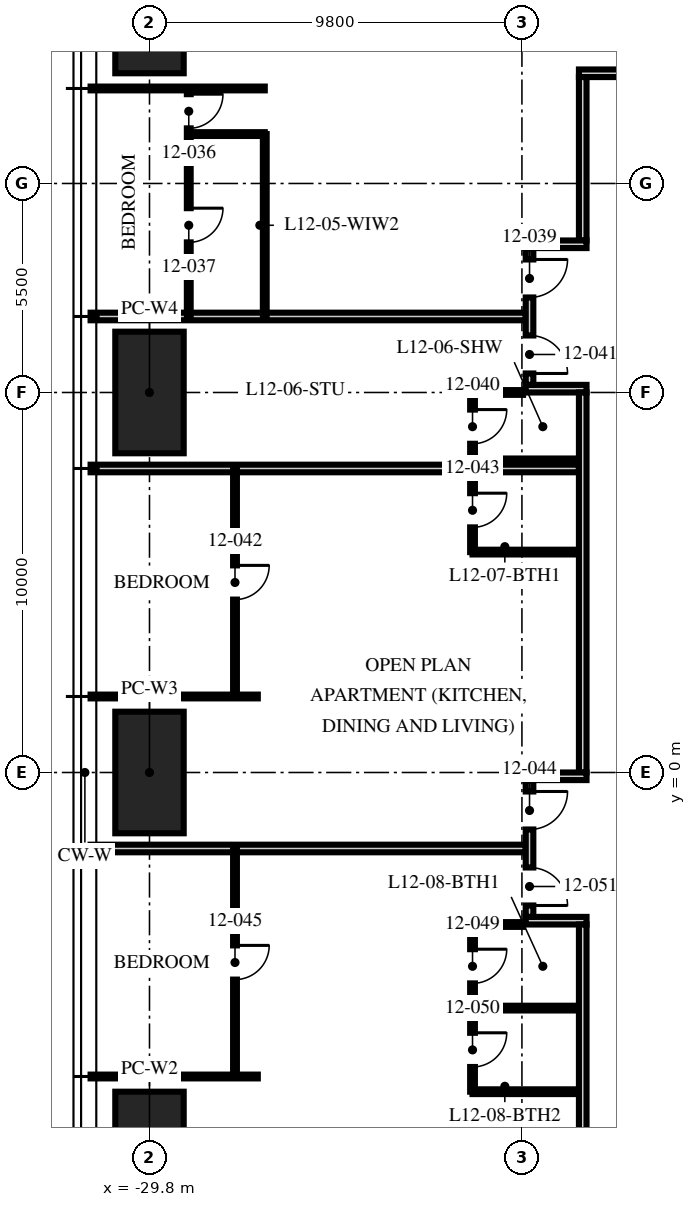
"""IFC4 building model, lengths in metres.
Left out: names, types, materials, properties, quantities, classifications, styles, units other than length and angle.
Written with IfcOpenShell. Run it as: python <this file> out.ifc"""

import sys

from ifc_helpers import new_model, si_unit, direction, frame, frame_2d, origin, origin_2d, place, context, subcontext, project, spatial, rectangle, hollow_rectangle, extrude, element, fill, save


model = new_model("IFC4")
c1 = context("Model", 3, precision=1e-05, world=origin(), true_north=direction((0.0, 1.0)))
c2 = subcontext(c1, "Body", "Model", "MODEL_VIEW")
j1 = project(units=[si_unit("LENGTHUNIT", "METRE"), si_unit("PLANEANGLEUNIT", "RADIAN")], contexts=[c1])
p1 = place(None, origin())
s1 = spatial("IfcSite", under=j1, at=p1, CompositionType="ELEMENT")
p2 = place(p1, origin())
s2 = spatial("IfcBuilding", under=s1, at=p2, CompositionType="ELEMENT")
p3 = place(p2, frame((0.0, 0.0, 51.0)))
s3 = spatial("IfcBuildingStorey", under=s2, at=p3, CompositionType="ELEMENT", Elevation=51.0)
for number, where, z_axis, x_axis in (
    (1, (-29.8, -10.0, 0.0), (0.0, 0.0, 1.0), (0.0, 1.0, 0.0)),
    (2, (-29.8, 0.0, 0.0), (0.0, 0.0, 1.0), (0.0, 1.0, 0.0)),
    (3, (-29.8, 10.0, 0.0), (0.0, 0.0, 1.0), (0.0, 1.0, 0.0)),
    (4, (-29.8, 20.0, 0.0), (0.0, 0.0, 1.0), (0.0, 1.0, 0.0)),
):
    element("IfcColumn", number, at=place(p3, frame(where, z_axis=z_axis, x_axis=x_axis)), inside=s3, PredefinedType="COLUMN", context=c2, shape_type="SweptSolid", body=[
        extrude(hollow_rectangle(XDim=3.2, YDim=1.8, WallThickness=0.2, at=origin_2d()), origin(), (0.0, 0.0, 1.0), 3.75),
    ])
p4 = place(p3, frame((-26.767, 18.0, 0.0), z_axis=(0.0, 0.0, 1.0), x_axis=(-1.0, 0.0, 0.0)))
e5 = element("IfcWall", 5, at=p4, inside=s3, PredefinedType="PARTITIONING", context=c2, shape_type="SweptSolid", body=[
    extrude(rectangle(XDim=4.583, YDim=0.1, at=frame_2d((2.292, 0.0))), origin(), (0.0, 0.0, 1.0), 2.71),
])
p5 = place(p3, frame((-19.9, 12.0, 0.0), z_axis=(0.0, 0.0, 1.0), x_axis=(-1.0, 0.0, 0.0)))
e6 = element("IfcWall", 6, at=p5, inside=s3, PredefinedType="PARTITIONING", context=c2, shape_type="SweptSolid", body=[
    extrude(rectangle(XDim=11.45, YDim=0.2, at=frame_2d((5.725, 0.0))), origin(), (0.0, 0.0, 1.0), 2.71),
])
p6 = place(p3, frame((-18.5, 8.0, 0.0), z_axis=(0.0, 0.0, 1.0), x_axis=(-1.0, 0.0, 0.0)))
e7 = element("IfcWall", 7, at=p6, inside=s3, PredefinedType="PARTITIONING", context=c2, shape_type="SweptSolid", body=[
    extrude(rectangle(XDim=12.85, YDim=0.2, at=frame_2d((6.425, 0.0))), origin(), (0.0, 0.0, 1.0), 2.71),
])
p7 = place(p3, frame((-26.95, 2.0, 0.0), z_axis=(0.0, 0.0, 1.0), x_axis=(-1.0, 0.0, 0.0)))
e8 = element("IfcWall", 8, at=p7, inside=s3, PredefinedType="PARTITIONING", context=c2, shape_type="SweptSolid", body=[
    extrude(rectangle(XDim=4.4, YDim=0.1, at=frame_2d((2.2, 0.0))), origin(), (0.0, 0.0, 1.0), 2.71),
])
p8 = place(p3, frame((-19.9, -2.0, 0.0), z_axis=(0.0, 0.0, 1.0), x_axis=(-1.0, 0.0, 0.0)))
e9 = element("IfcWall", 9, at=p8, inside=s3, PredefinedType="PARTITIONING", context=c2, shape_type="SweptSolid", body=[
    extrude(rectangle(XDim=11.45, YDim=0.2, at=frame_2d((5.725, 0.0))), origin(), (0.0, 0.0, 1.0), 2.71),
])
p9 = place(p3, frame((-26.95, -8.0, 0.0), z_axis=(0.0, 0.0, 1.0), x_axis=(-1.0, 0.0, 0.0)))
e10 = element("IfcWall", 10, at=p9, inside=s3, PredefinedType="PARTITIONING", context=c2, shape_type="SweptSolid", body=[
    extrude(rectangle(XDim=4.4, YDim=0.1, at=frame_2d((2.2, 0.0))), origin(), (0.0, 0.0, 1.0), 2.71),
])
p10 = place(p3, frame((-28.767, 18.0, 0.0), z_axis=(0.0, 0.0, 1.0), x_axis=(0.0, -1.0, 0.0)))
e11 = element("IfcWall", 11, at=p10, inside=s3, PredefinedType="PARTITIONING", context=c2, shape_type="SweptSolid", body=[
    extrude(rectangle(XDim=6.0, YDim=0.1, at=frame_2d((3.0, 0.0))), origin(), (0.0, 0.0, 1.0), 2.61),
])
p11 = place(p10, frame((0.15, 0.0, 0.0)))
e12 = element("IfcOpeningElement", 12, at=p11, cuts=e11, PredefinedType="OPENING", context=c2, shape_type="SweptSolid", body=[
    extrude(rectangle(XDim=0.9, YDim=2.1, at=frame_2d((0.45, 1.05))), frame((0.0, 0.06, 0.0), z_axis=(0.0, -1.0, 0.0), x_axis=(1.0, 0.0, 0.0)), (0.0, 0.0, 1.0), 0.12),
])
p12 = place(p10, frame((3.15, 0.0, 0.0)))
e13 = element("IfcOpeningElement", 13, at=p12, cuts=e11, PredefinedType="OPENING", context=c2, shape_type="SweptSolid", body=[
    extrude(rectangle(XDim=0.9, YDim=2.1, at=frame_2d((0.45, 1.05))), frame((0.0, 0.06, 0.0), z_axis=(0.0, -1.0, 0.0), x_axis=(1.0, 0.0, 0.0)), (0.0, 0.0, 1.0), 0.12),
])
p13 = place(p3, frame((-26.767, 16.8, 0.0), z_axis=(0.0, 0.0, 1.0), x_axis=(-1.0, 0.0, 0.0)))
e14 = element("IfcWall", 14, at=p13, inside=s3, PredefinedType="PARTITIONING", context=c2, shape_type="SweptSolid", body=[
    extrude(rectangle(XDim=2.0, YDim=0.1, at=frame_2d((1.0, 0.0))), origin(), (0.0, 0.0, 1.0), 3.5),
])
p14 = place(p3, frame((-26.767, 16.8, 0.0), z_axis=(0.0, 0.0, 1.0), x_axis=(0.0, -1.0, 0.0)))
e15 = element("IfcWall", 15, at=p14, inside=s3, PredefinedType="PARTITIONING", context=c2, shape_type="SweptSolid", body=[
    extrude(rectangle(XDim=4.8, YDim=0.1, at=frame_2d((2.4, 0.0))), origin(), (0.0, 0.0, 1.0), 2.61),
])
p15 = place(p3, frame((-21.3, 10.0, 0.0), z_axis=(0.0, 0.0, 1.0), x_axis=(0.0, -1.0, 0.0)))
e16 = element("IfcWall", 16, at=p15, inside=s3, PredefinedType="PARTITIONING", context=c2, shape_type="SweptSolid", body=[
    extrude(rectangle(XDim=1.8, YDim=0.125, at=frame_2d((0.9, 0.0))), origin(), (0.0, 0.0, 1.0), 2.492),
])
p16 = place(p15, frame((0.45, 0.0, 0.0)))
e17 = element("IfcOpeningElement", 17, at=p16, cuts=e16, PredefinedType="OPENING", context=c2, shape_type="SweptSolid", body=[
    extrude(rectangle(XDim=0.9, YDim=2.1, at=frame_2d((0.45, 1.05))), frame((0.0, 0.073, 0.0), z_axis=(0.0, -1.0, 0.0), x_axis=(1.0, 0.0, 0.0)), (0.0, 0.0, 1.0), 0.145),
])
p17 = place(p3, frame((-19.97, 10.0, 0.0), z_axis=(0.0, 0.0, 1.0), x_axis=(-1.0, 0.0, 0.0)))
e18 = element("IfcWall", 18, at=p17, inside=s3, PredefinedType="PARTITIONING", context=c2, shape_type="SweptSolid", body=[
    extrude(rectangle(XDim=1.33, YDim=0.125, at=frame_2d((0.665, 0.0))), origin(), (0.0, 0.0, 1.0), 2.492),
])
p18 = place(p3, frame((-18.5, 8.2, 0.0), z_axis=(0.0, 0.0, 1.0), x_axis=(-1.0, 0.0, 0.0)))
e19 = element("IfcWall", 19, at=p18, inside=s3, PredefinedType="PARTITIONING", context=c2, shape_type="SweptSolid", body=[
    extrude(rectangle(XDim=2.8, YDim=0.125, at=frame_2d((1.4, 0.0))), origin(), (0.0, 0.0, 1.0), 3.5),
])
p19 = place(p3, frame((-27.55, 8.0, 0.0), z_axis=(0.0, 0.0, 1.0), x_axis=(0.0, -1.0, 0.0)))
e20 = element("IfcWall", 20, at=p19, inside=s3, PredefinedType="PARTITIONING", context=c2, shape_type="SweptSolid", body=[
    extrude(rectangle(XDim=6.0, YDim=0.1, at=frame_2d((3.0, 0.0))), origin(), (0.0, 0.0, 1.0), 2.61),
])
p20 = place(p19, frame((2.55, 0.0, 0.0)))
e21 = element("IfcOpeningElement", 21, at=p20, cuts=e20, PredefinedType="OPENING", context=c2, shape_type="SweptSolid", body=[
    extrude(rectangle(XDim=0.9, YDim=2.1, at=frame_2d((0.45, 1.05))), frame((0.0, 0.06, 0.0), z_axis=(0.0, -1.0, 0.0), x_axis=(1.0, 0.0, 0.0)), (0.0, 0.0, 1.0), 0.12),
])
p21 = place(p3, frame((-21.3, 8.0, 0.0), z_axis=(0.0, 0.0, 1.0), x_axis=(0.0, -1.0, 0.0)))
e22 = element("IfcWall", 22, at=p21, inside=s3, PredefinedType="PARTITIONING", context=c2, shape_type="SweptSolid", body=[
    extrude(rectangle(XDim=2.2, YDim=0.125, at=frame_2d((1.1, 0.0))), origin(), (0.0, 0.0, 1.0), 3.5),
])
p22 = place(p21, frame((0.65, 0.0, 0.0)))
e23 = element("IfcOpeningElement", 23, at=p22, cuts=e22, PredefinedType="OPENING", context=c2, shape_type="SweptSolid", body=[
    extrude(rectangle(XDim=0.9, YDim=2.1, at=frame_2d((0.45, 1.05))), frame((0.0, 0.073, 0.0), z_axis=(0.0, -1.0, 0.0), x_axis=(1.0, 0.0, 0.0)), (0.0, 0.0, 1.0), 0.145),
])
p23 = place(p3, frame((-18.5, 5.8, 0.0), z_axis=(0.0, 0.0, 1.0), x_axis=(-1.0, 0.0, 0.0)))
e24 = element("IfcWall", 24, at=p23, inside=s3, PredefinedType="PARTITIONING", context=c2, shape_type="SweptSolid", body=[
    extrude(rectangle(XDim=2.8, YDim=0.125, at=frame_2d((1.4, 0.0))), origin(), (0.0, 0.0, 1.0), 3.5),
])
p24 = place(p3, frame((-27.55, -2.0, 0.0), z_axis=(0.0, 0.0, 1.0), x_axis=(0.0, -1.0, 0.0)))
e25 = element("IfcWall", 25, at=p24, inside=s3, PredefinedType="PARTITIONING", context=c2, shape_type="SweptSolid", body=[
    extrude(rectangle(XDim=6.0, YDim=0.1, at=frame_2d((3.0, 0.0))), origin(), (0.0, 0.0, 1.0), 2.61),
])
p25 = place(p24, frame((2.55, 0.0, 0.0)))
e26 = element("IfcOpeningElement", 26, at=p25, cuts=e25, PredefinedType="OPENING", context=c2, shape_type="SweptSolid", body=[
    extrude(rectangle(XDim=0.9, YDim=2.1, at=frame_2d((0.45, 1.05))), frame((0.0, 0.06, 0.0), z_axis=(0.0, -1.0, 0.0), x_axis=(1.0, 0.0, 0.0)), (0.0, 0.0, 1.0), 0.12),
])
p26 = place(p3, frame((-21.3, -4.0, 0.0), z_axis=(0.0, 0.0, 1.0), x_axis=(0.0, -1.0, 0.0)))
e27 = element("IfcWall", 27, at=p26, inside=s3, PredefinedType="PARTITIONING", context=c2, shape_type="SweptSolid", body=[
    extrude(rectangle(XDim=4.4, YDim=0.125, at=frame_2d((2.2, 0.0))), origin(), (0.0, 0.0, 1.0), 2.61),
])
p27 = place(p26, frame((0.65, 0.0, 0.0)))
e28 = element("IfcOpeningElement", 28, at=p27, cuts=e27, PredefinedType="OPENING", context=c2, shape_type="SweptSolid", body=[
    extrude(rectangle(XDim=0.9, YDim=2.1, at=frame_2d((0.45, 1.05))), frame((0.0, 0.073, 0.0), z_axis=(0.0, -1.0, 0.0), x_axis=(1.0, 0.0, 0.0)), (0.0, 0.0, 1.0), 0.145),
])
p28 = place(p26, frame((2.85, 0.0, 0.0)))
e29 = element("IfcOpeningElement", 29, at=p28, cuts=e27, PredefinedType="OPENING", context=c2, shape_type="SweptSolid", body=[
    extrude(rectangle(XDim=0.9, YDim=2.1, at=frame_2d((0.45, 1.05))), frame((0.0, 0.073, 0.0), z_axis=(0.0, -1.0, 0.0), x_axis=(1.0, 0.0, 0.0)), (0.0, 0.0, 1.0), 0.145),
])
p29 = place(p3, frame((-19.97, -4.0, 0.0), z_axis=(0.0, 0.0, 1.0), x_axis=(-1.0, 0.0, 0.0)))
e30 = element("IfcWall", 30, at=p29, inside=s3, PredefinedType="PARTITIONING", context=c2, shape_type="SweptSolid", body=[
    extrude(rectangle(XDim=1.33, YDim=0.125, at=frame_2d((0.665, 0.0))), origin(), (0.0, 0.0, 1.0), 3.5),
])
for number, where, z_axis, x_axis in (
    (31, (-18.5, -6.2, 0.0), (0.0, 0.0, 1.0), (-1.0, 0.0, 0.0)),
    (32, (-18.5, -8.4, 0.0), (0.0, 0.0, 1.0), (-1.0, 0.0, 0.0)),
):
    element("IfcWall", number, at=place(p3, frame(where, z_axis=z_axis, x_axis=x_axis)), inside=s3, PredefinedType="PARTITIONING", context=c2, shape_type="SweptSolid", body=[
        extrude(rectangle(XDim=2.8, YDim=0.125, at=frame_2d((1.4, 0.0))), origin(), (0.0, 0.0, 1.0), 3.5),
    ])
p30 = place(p3, frame((-18.5, 18.4, 0.0), z_axis=(0.0, 0.0, 1.0), x_axis=(1.0, 0.0, 0.0)))
e33 = element("IfcWall", 33, at=p30, inside=s3, PredefinedType="PARTITIONING", context=c2, shape_type="SweptSolid", body=[
    extrude(rectangle(XDim=18.5, YDim=0.2, at=frame_2d((9.25, 0.0))), origin(), (0.0, 0.0, 1.0), 2.3),
])
p31 = place(p3, frame((-18.4, 18.3, 0.0), z_axis=(0.0, 0.0, 1.0), x_axis=(0.0, -1.0, 0.0)))
e34 = element("IfcWall", 34, at=p31, inside=s3, PredefinedType="PARTITIONING", context=c2, shape_type="SweptSolid", body=[
    extrude(rectangle(XDim=4.3, YDim=0.2, at=frame_2d((2.15, 0.0))), origin(), (0.0, 0.0, 1.0), 2.3),
])
p32 = place(p3, frame((-18.3, 13.9, 0.0), z_axis=(0.0, 0.0, 1.0), x_axis=(-1.0, 0.0, 0.0)))
e35 = element("IfcWall", 35, at=p32, inside=s3, PredefinedType="PARTITIONING", context=c2, shape_type="SweptSolid", body=[
    extrude(rectangle(XDim=1.6, YDim=0.2, at=frame_2d((0.8, 0.0))), origin(), (0.0, 0.0, 1.0), 3.5),
])
p33 = place(p3, frame((-18.3, 10.1, 0.0), z_axis=(0.0, 0.0, 1.0), x_axis=(-1.0, 0.0, 0.0)))
e36 = element("IfcWall", 36, at=p33, inside=s3, PredefinedType="PARTITIONING", context=c2, shape_type="SweptSolid", body=[
    extrude(rectangle(XDim=1.6, YDim=0.2, at=frame_2d((0.8, 0.0))), origin(), (0.0, 0.0, 1.0), 2.492),
])
p34 = place(p3, frame((-19.8, 13.8, 0.0), z_axis=(0.0, 0.0, 1.0), x_axis=(0.0, -1.0, 0.0)))
e37 = element("IfcWall", 37, at=p34, inside=s3, PredefinedType="PARTITIONING", context=c2, shape_type="SweptSolid", body=[
    extrude(rectangle(XDim=3.6, YDim=0.2, at=frame_2d((1.8, 0.0))), origin(), (0.0, 0.0, 1.0), 3.5),
])
p35 = place(p34, frame((0.3, 0.0, 0.0)))
e38 = element("IfcOpeningElement", 38, at=p35, cuts=e37, PredefinedType="OPENING", context=c2, shape_type="SweptSolid", body=[
    extrude(rectangle(XDim=1.0, YDim=2.2, at=frame_2d((0.5, 1.1))), frame((0.0, 0.11, 0.0), z_axis=(0.0, -1.0, 0.0), x_axis=(1.0, 0.0, 0.0)), (0.0, 0.0, 1.0), 0.22),
])
p36 = place(p34, frame((2.3, 0.0, 0.0)))
e39 = element("IfcOpeningElement", 39, at=p36, cuts=e37, PredefinedType="OPENING", context=c2, shape_type="SweptSolid", body=[
    extrude(rectangle(XDim=1.0, YDim=2.2, at=frame_2d((0.5, 1.1))), frame((0.0, 0.11, 0.0), z_axis=(0.0, -1.0, 0.0), x_axis=(1.0, 0.0, 0.0)), (0.0, 0.0, 1.0), 0.22),
])
p37 = place(p3, frame((-18.4, 10.0, 0.0), z_axis=(0.0, 0.0, 1.0), x_axis=(0.0, -1.0, 0.0)))
e40 = element("IfcWall", 40, at=p37, inside=s3, PredefinedType="PARTITIONING", context=c2, shape_type="SweptSolid", body=[
    extrude(rectangle(XDim=10.0, YDim=0.2, at=frame_2d((5.0, 0.0))), origin(), (0.0, 0.0, 1.0), 2.492),
])
p38 = place(p3, frame((-18.3, -0.1, 0.0), z_axis=(0.0, 0.0, 1.0), x_axis=(-1.0, 0.0, 0.0)))
e41 = element("IfcWall", 41, at=p38, inside=s3, PredefinedType="PARTITIONING", context=c2, shape_type="SweptSolid", body=[
    extrude(rectangle(XDim=1.6, YDim=0.2, at=frame_2d((0.8, 0.0))), origin(), (0.0, 0.0, 1.0), 2.492),
])
p39 = place(p3, frame((-18.3, -3.9, 0.0), z_axis=(0.0, 0.0, 1.0), x_axis=(-1.0, 0.0, 0.0)))
e42 = element("IfcWall", 42, at=p39, inside=s3, PredefinedType="PARTITIONING", context=c2, shape_type="SweptSolid", body=[
    extrude(rectangle(XDim=1.6, YDim=0.2, at=frame_2d((0.8, 0.0))), origin(), (0.0, 0.0, 1.0), 3.5),
])
p40 = place(p3, frame((-19.8, -0.2, 0.0), z_axis=(0.0, 0.0, 1.0), x_axis=(0.0, -1.0, 0.0)))
e43 = element("IfcWall", 43, at=p40, inside=s3, PredefinedType="PARTITIONING", context=c2, shape_type="SweptSolid", body=[
    extrude(rectangle(XDim=3.6, YDim=0.2, at=frame_2d((1.8, 0.0))), origin(), (0.0, 0.0, 1.0), 3.5),
])
p41 = place(p40, frame((0.3, 0.0, 0.0)))
e44 = element("IfcOpeningElement", 44, at=p41, cuts=e43, PredefinedType="OPENING", context=c2, shape_type="SweptSolid", body=[
    extrude(rectangle(XDim=1.0, YDim=2.2, at=frame_2d((0.5, 1.1))), frame((0.0, 0.11, 0.0), z_axis=(0.0, -1.0, 0.0), x_axis=(1.0, 0.0, 0.0)), (0.0, 0.0, 1.0), 0.22),
])
p42 = place(p40, frame((2.3, 0.0, 0.0)))
e45 = element("IfcOpeningElement", 45, at=p42, cuts=e43, PredefinedType="OPENING", context=c2, shape_type="SweptSolid", body=[
    extrude(rectangle(XDim=1.0, YDim=2.2, at=frame_2d((0.5, 1.1))), frame((0.0, 0.11, 0.0), z_axis=(0.0, -1.0, 0.0), x_axis=(1.0, 0.0, 0.0)), (0.0, 0.0, 1.0), 0.22),
])
p43 = place(p3, frame((-18.4, -4.0, 0.0), z_axis=(0.0, 0.0, 1.0), x_axis=(0.0, -1.0, 0.0)))
e46 = element("IfcWall", 46, at=p43, inside=s3, PredefinedType="PARTITIONING", context=c2, shape_type="SweptSolid", body=[
    extrude(rectangle(XDim=14.3, YDim=0.2, at=frame_2d((7.15, 0.0))), origin(), (0.0, 0.0, 1.0), 2.3),
])
p44 = place(p11, origin())
e47 = element("IfcDoor", 47, at=p44, inside=s3, OperationType="SINGLE_SWING_LEFT", PredefinedType="DOOR", context=c2, shape_type="SweptSolid", body=[
    extrude(rectangle(XDim=0.9, YDim=2.1, at=frame_2d((0.45, 1.05))), frame((0.0, 0.025, 0.0), z_axis=(0.0, -1.0, 0.0), x_axis=(1.0, 0.0, 0.0)), (0.0, 0.0, 1.0), 0.05),
])
fill(e12, e47)
p45 = place(p12, origin())
e48 = element("IfcDoor", 48, at=p45, inside=s3, OperationType="SINGLE_SWING_LEFT", PredefinedType="DOOR", context=c2, shape_type="SweptSolid", body=[
    extrude(rectangle(XDim=0.9, YDim=2.1, at=frame_2d((0.45, 1.05))), frame((0.0, 0.025, 0.0), z_axis=(0.0, -1.0, 0.0), x_axis=(1.0, 0.0, 0.0)), (0.0, 0.0, 1.0), 0.05),
])
fill(e13, e48)
p46 = place(p35, origin())
e49 = element("IfcDoor", 49, at=p46, inside=s3, OperationType="SINGLE_SWING_LEFT", PredefinedType="DOOR", context=c2, shape_type="SweptSolid", body=[
    extrude(rectangle(XDim=1.0, YDim=2.2, at=frame_2d((0.5, 1.1))), frame((0.0, 0.025, 0.0), z_axis=(0.0, -1.0, 0.0), x_axis=(1.0, 0.0, 0.0)), (0.0, 0.0, 1.0), 0.05),
])
fill(e38, e49)
p47 = place(p16, origin())
e50 = element("IfcDoor", 50, at=p47, inside=s3, OperationType="SINGLE_SWING_LEFT", PredefinedType="DOOR", context=c2, shape_type="SweptSolid", body=[
    extrude(rectangle(XDim=0.9, YDim=2.1, at=frame_2d((0.45, 1.05))), frame((0.0, 0.025, 0.0), z_axis=(0.0, -1.0, 0.0), x_axis=(1.0, 0.0, 0.0)), (0.0, 0.0, 1.0), 0.05),
])
fill(e17, e50)
p48 = place(p36, origin())
e51 = element("IfcDoor", 51, at=p48, inside=s3, OperationType="SINGLE_SWING_RIGHT", PredefinedType="DOOR", context=c2, shape_type="SweptSolid", body=[
    extrude(rectangle(XDim=1.0, YDim=2.2, at=frame_2d((0.5, 1.1))), frame((0.0, 0.025, 0.0), z_axis=(0.0, -1.0, 0.0), x_axis=(1.0, 0.0, 0.0)), (0.0, 0.0, 1.0), 0.05),
])
fill(e39, e51)
p49 = place(p20, origin())
e52 = element("IfcDoor", 52, at=p49, inside=s3, OperationType="SINGLE_SWING_LEFT", PredefinedType="DOOR", context=c2, shape_type="SweptSolid", body=[
    extrude(rectangle(XDim=0.9, YDim=2.1, at=frame_2d((0.45, 1.05))), frame((0.0, 0.025, 0.0), z_axis=(0.0, -1.0, 0.0), x_axis=(1.0, 0.0, 0.0)), (0.0, 0.0, 1.0), 0.05),
])
fill(e21, e52)
p50 = place(p22, origin())
e53 = element("IfcDoor", 53, at=p50, inside=s3, OperationType="SINGLE_SWING_LEFT", PredefinedType="DOOR", context=c2, shape_type="SweptSolid", body=[
    extrude(rectangle(XDim=0.9, YDim=2.1, at=frame_2d((0.45, 1.05))), frame((0.0, 0.025, 0.0), z_axis=(0.0, -1.0, 0.0), x_axis=(1.0, 0.0, 0.0)), (0.0, 0.0, 1.0), 0.05),
])
fill(e23, e53)
p51 = place(p41, origin())
e54 = element("IfcDoor", 54, at=p51, inside=s3, OperationType="SINGLE_SWING_LEFT", PredefinedType="DOOR", context=c2, shape_type="SweptSolid", body=[
    extrude(rectangle(XDim=1.0, YDim=2.2, at=frame_2d((0.5, 1.1))), frame((0.0, 0.025, 0.0), z_axis=(0.0, -1.0, 0.0), x_axis=(1.0, 0.0, 0.0)), (0.0, 0.0, 1.0), 0.05),
])
fill(e44, e54)
p52 = place(p25, origin())
e55 = element("IfcDoor", 55, at=p52, inside=s3, OperationType="SINGLE_SWING_LEFT", PredefinedType="DOOR", context=c2, shape_type="SweptSolid", body=[
    extrude(rectangle(XDim=0.9, YDim=2.1, at=frame_2d((0.45, 1.05))), frame((0.0, 0.025, 0.0), z_axis=(0.0, -1.0, 0.0), x_axis=(1.0, 0.0, 0.0)), (0.0, 0.0, 1.0), 0.05),
])
fill(e26, e55)
p53 = place(p27, origin())
e56 = element("IfcDoor", 56, at=p53, inside=s3, OperationType="SINGLE_SWING_LEFT", PredefinedType="DOOR", context=c2, shape_type="SweptSolid", body=[
    extrude(rectangle(XDim=0.9, YDim=2.1, at=frame_2d((0.45, 1.05))), frame((0.0, 0.025, 0.0), z_axis=(0.0, -1.0, 0.0), x_axis=(1.0, 0.0, 0.0)), (0.0, 0.0, 1.0), 0.05),
])
fill(e28, e56)
p54 = place(p28, origin())
e57 = element("IfcDoor", 57, at=p54, inside=s3, OperationType="SINGLE_SWING_LEFT", PredefinedType="DOOR", context=c2, shape_type="SweptSolid", body=[
    extrude(rectangle(XDim=0.9, YDim=2.1, at=frame_2d((0.45, 1.05))), frame((0.0, 0.025, 0.0), z_axis=(0.0, -1.0, 0.0), x_axis=(1.0, 0.0, 0.0)), (0.0, 0.0, 1.0), 0.05),
])
fill(e29, e57)
p55 = place(p42, origin())
e58 = element("IfcDoor", 58, at=p55, inside=s3, OperationType="SINGLE_SWING_RIGHT", PredefinedType="DOOR", context=c2, shape_type="SweptSolid", body=[
    extrude(rectangle(XDim=1.0, YDim=2.2, at=frame_2d((0.5, 1.1))), frame((0.0, 0.025, 0.0), z_axis=(0.0, -1.0, 0.0), x_axis=(1.0, 0.0, 0.0)), (0.0, 0.0, 1.0), 0.05),
])
fill(e45, e58)
save(model, sys.argv[1])
